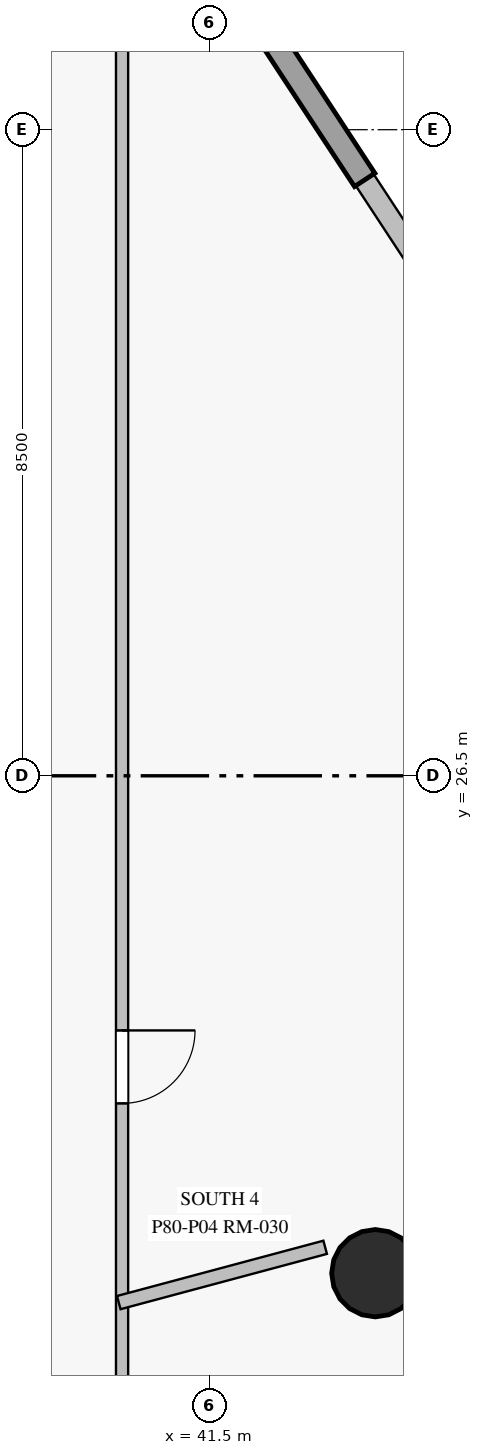
"""IFC4 building model, lengths in metres.
Left out: names, types, materials, properties, quantities, classifications, styles, units other than length and angle.
Written with IfcOpenShell. Run it as: python <this file> out.ifc"""

import sys

from ifc_helpers import new_model, si_unit, direction, frame, frame_2d, origin, origin_with_axes, origin_2d, place, context, subcontext, project, spatial, rectangle, circle, extrude, source, transform, mapped, element, fill, save


model = new_model("IFC4")
c1 = context("Model", 3, precision=1e-05, world=origin(), true_north=direction((0.0, 1.0)))
c2 = subcontext(c1, "Body", "Model", "MODEL_VIEW")
j1 = project(units=[si_unit("LENGTHUNIT", "METRE"), si_unit("PLANEANGLEUNIT", "RADIAN")], contexts=[c1])
p1 = place(None, origin())
s1 = spatial("IfcSite", under=j1, at=p1, CompositionType="ELEMENT")
p2 = place(p1, origin())
s2 = spatial("IfcBuilding", under=s1, at=p2, CompositionType="ELEMENT")
p3 = place(p2, frame((0.0, 0.0, 268.75)))
s3 = spatial("IfcBuildingStorey", under=s2, at=p3, CompositionType="ELEMENT", Elevation=268.75)
m1 = source(origin_with_axes(), c2, "Body", "SweptSolid", [
    extrude(circle(Radius=0.575, at=origin_2d()), origin(), (0.0, 0.0, 1.0), 4.65),
])
p4 = place(p3, frame((43.682, 19.956, 0.0), z_axis=(0.0, 0.0, 1.0), x_axis=(1.0, 0.0, 0.0)))
e1 = element("IfcColumn", 1, at=p4, inside=s3, PredefinedType="COLUMN", context=c2, shape_type="MappedRepresentation", body=[
    mapped(m1, transform((0.0, 0.0, 0.0), scale=1.0)),
])
p5 = place(p3, frame((42.987, 15.742, 0.0), z_axis=(0.0, 0.0, 1.0), x_axis=(0.504548875511, 0.863383131767, 0.0)))
e2 = element("IfcWall", 2, at=p5, inside=s3, PredefinedType="SOLIDWALL", context=c2, shape_type="SweptSolid", body=[
    extrude(rectangle(XDim=8.642, YDim=0.28, at=frame_2d((4.321, 0.0))), origin(), (0.0, 0.0, 1.0), 4.375),
])
p6 = place(p3, frame((44.493, 32.891, 0.0), z_axis=(0.0, 0.0, 1.0), x_axis=(-0.548728671622, 0.836000505347, 0.0)))
e3 = element("IfcWall", 3, at=p6, inside=s3, PredefinedType="SOLIDWALL", context=c2, shape_type="SweptSolid", body=[
    extrude(rectangle(XDim=6.866, YDim=0.28, at=frame_2d((3.433, 0.0))), origin(), (0.0, 0.0, 1.0), 4.375),
])
p7 = place(p3, frame((40.35, 37.35, 0.0), z_axis=(0.0, 0.0, 1.0), x_axis=(0.0, -1.0, 0.0)))
e4 = element("IfcWall", 4, at=p7, inside=s3, PredefinedType="PARTITIONING", context=c2, shape_type="SweptSolid", body=[
    extrude(rectangle(XDim=21.7, YDim=0.16, at=frame_2d((10.85, 0.0))), origin(), (0.0, 0.0, 1.0), 3.475),
])
p8 = place(p7, frame((14.2, 0.0, 0.0)))
e5 = element("IfcOpeningElement", 5, at=p8, cuts=e4, PredefinedType="OPENING", context=c2, shape_type="SweptSolid", body=[
    extrude(rectangle(XDim=0.96, YDim=2.15, at=frame_2d((0.48, 1.075))), frame((0.0, 0.09, 0.0), z_axis=(0.0, -1.0, 0.0), x_axis=(1.0, 0.0, 0.0)), (0.0, 0.0, 1.0), 0.18),
])
p9 = place(p3, frame((43.022, 20.297, 0.0), z_axis=(0.0, 0.0, 1.0), x_axis=(-0.965934485278, -0.258786727153, 0.0)))
e6 = element("IfcWall", 6, at=p9, inside=s3, PredefinedType="PARTITIONING", context=c2, shape_type="SweptSolid", body=[
    extrude(rectangle(XDim=2.811, YDim=0.18, at=frame_2d((1.406, 0.0))), origin(), (0.0, 0.0, 1.0), 3.475),
])
m2 = source(origin_with_axes(), c2, "Body", "SweptSolid", [
    extrude(rectangle(XDim=0.96, YDim=2.15, at=frame_2d((0.48, 1.075))), frame((0.0, 0.025, 0.0), z_axis=(0.0, -1.0, 0.0), x_axis=(1.0, 0.0, 0.0)), (0.0, 0.0, 1.0), 0.05),
])
p10 = place(p8, origin())
e7 = element("IfcDoor", 7, at=p10, inside=s3, OperationType="SINGLE_SWING_LEFT", PredefinedType="DOOR", context=c2, shape_type="MappedRepresentation", body=[
    mapped(m2, transform((0.0, 0.0, 0.0), scale=1.0)),
])
fill(e5, e7)
save(model, sys.argv[1])
